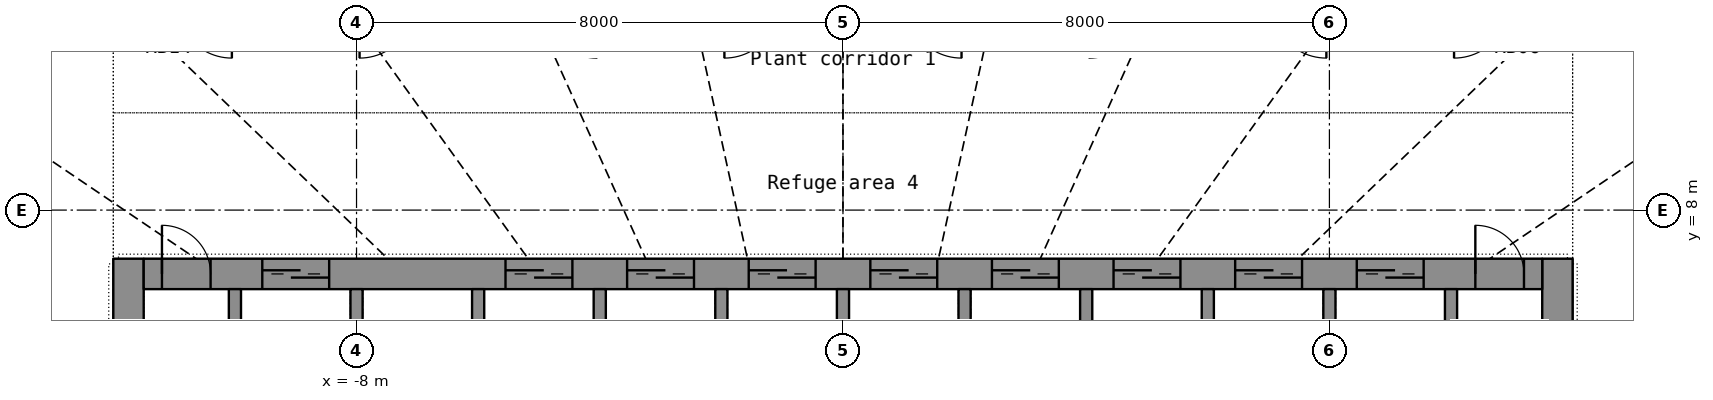
"""IFC4 building model, lengths in metres.
Left out: names, types, materials, properties, quantities, classifications, styles, units other than length and angle.
Written with IfcOpenShell. Run it as: python <this file> out.ifc"""

import sys

from ifc_helpers import new_model, si_unit, direction, frame, frame_2d, origin, place, context, subcontext, project, spatial, rectangle, extrude, element, fill, save


model = new_model("IFC4")
c1 = context("Model", 3, precision=1e-05, world=origin(), true_north=direction((0.0, 1.0)))
c2 = subcontext(c1, "Body", "Model", "MODEL_VIEW")
j1 = project(units=[si_unit("LENGTHUNIT", "METRE"), si_unit("PLANEANGLEUNIT", "RADIAN")], contexts=[c1])
p1 = place(None, origin())
s1 = spatial("IfcSite", under=j1, at=p1, CompositionType="ELEMENT")
p2 = place(p1, origin())
s2 = spatial("IfcBuilding", under=s1, at=p2, CompositionType="ELEMENT")
p3 = place(p2, frame((0.0, 0.0, 152.6)))
s3 = spatial("IfcBuildingStorey", under=s2, at=p3, CompositionType="ELEMENT", Elevation=152.6)
p4 = place(p3, frame((-11.75, -7.2, 0.0), z_axis=(0.0, 0.0, 1.0), x_axis=(0.0, 1.0, 0.0)))
e1 = element("IfcWall", 1, at=p4, inside=s3, PredefinedType="SHEAR", context=c2, shape_type="SweptSolid", body=[
    extrude(rectangle(XDim=14.4, YDim=0.5, at=frame_2d((7.2, 0.0))), origin(), (0.0, 0.0, 1.0), 4.1),
])
p5 = place(p4, frame((6.5, 0.0, 0.0)))
e2 = element("IfcOpeningElement", 2, at=p5, cuts=e1, PredefinedType="OPENING", context=c2, shape_type="SweptSolid", body=[
    extrude(rectangle(XDim=1.4, YDim=2.2, at=frame_2d((0.7, 1.1))), frame((0.0, 0.26, 0.0), z_axis=(0.0, -1.0, 0.0), x_axis=(1.0, 0.0, 0.0)), (0.0, 0.0, 1.0), 0.52),
])
p6 = place(p3, frame((11.75, -7.2, 0.0), z_axis=(0.0, 0.0, 1.0), x_axis=(0.0, 1.0, 0.0)))
e3 = element("IfcWall", 3, at=p6, inside=s3, PredefinedType="SHEAR", context=c2, shape_type="SweptSolid", body=[
    extrude(rectangle(XDim=14.4, YDim=0.5, at=frame_2d((7.2, 0.0))), origin(), (0.0, 0.0, 1.0), 4.1),
])
p7 = place(p6, frame((6.5, 0.0, 0.0)))
e4 = element("IfcOpeningElement", 4, at=p7, cuts=e3, PredefinedType="OPENING", context=c2, shape_type="SweptSolid", body=[
    extrude(rectangle(XDim=1.4, YDim=2.2, at=frame_2d((0.7, 1.1))), frame((0.0, 0.26, 0.0), z_axis=(0.0, -1.0, 0.0), x_axis=(1.0, 0.0, 0.0)), (0.0, 0.0, 1.0), 0.52),
])
p8 = place(p3, frame((-11.5, 6.95, 0.0), z_axis=(0.0, 0.0, 1.0), x_axis=(1.0, 0.0, 0.0)))
e5 = element("IfcWall", 5, at=p8, inside=s3, PredefinedType="SHEAR", context=c2, shape_type="SweptSolid", body=[
    extrude(rectangle(XDim=23.0, YDim=0.5, at=frame_2d((11.5, 0.0))), origin(), (0.0, 0.0, 1.0), 4.1),
])
p9 = place(p8, frame((1.95, 0.0, 0.0)))
e6 = element("IfcOpeningElement", 6, at=p9, cuts=e5, PredefinedType="OPENING", context=c2, shape_type="SweptSolid", body=[
    extrude(rectangle(XDim=1.1, YDim=2.2, at=frame_2d((0.55, 1.1))), frame((0.0, 0.26, 0.0), z_axis=(0.0, -1.0, 0.0), x_axis=(1.0, 0.0, 0.0)), (0.0, 0.0, 1.0), 0.52),
])
p10 = place(p8, frame((5.95, 0.0, 0.0)))
e7 = element("IfcOpeningElement", 7, at=p10, cuts=e5, PredefinedType="OPENING", context=c2, shape_type="SweptSolid", body=[
    extrude(rectangle(XDim=1.1, YDim=2.2, at=frame_2d((0.55, 1.1))), frame((0.0, 0.26, 0.0), z_axis=(0.0, -1.0, 0.0), x_axis=(1.0, 0.0, 0.0)), (0.0, 0.0, 1.0), 0.52),
])
p11 = place(p8, frame((7.95, 0.0, 0.0)))
e8 = element("IfcOpeningElement", 8, at=p11, cuts=e5, PredefinedType="OPENING", context=c2, shape_type="SweptSolid", body=[
    extrude(rectangle(XDim=1.1, YDim=2.2, at=frame_2d((0.55, 1.1))), frame((0.0, 0.26, 0.0), z_axis=(0.0, -1.0, 0.0), x_axis=(1.0, 0.0, 0.0)), (0.0, 0.0, 1.0), 0.52),
])
p12 = place(p8, frame((9.95, 0.0, 0.0)))
e9 = element("IfcOpeningElement", 9, at=p12, cuts=e5, PredefinedType="OPENING", context=c2, shape_type="SweptSolid", body=[
    extrude(rectangle(XDim=1.1, YDim=2.2, at=frame_2d((0.55, 1.1))), frame((0.0, 0.26, 0.0), z_axis=(0.0, -1.0, 0.0), x_axis=(1.0, 0.0, 0.0)), (0.0, 0.0, 1.0), 0.52),
])
p13 = place(p8, frame((11.95, 0.0, 0.0)))
e10 = element("IfcOpeningElement", 10, at=p13, cuts=e5, PredefinedType="OPENING", context=c2, shape_type="SweptSolid", body=[
    extrude(rectangle(XDim=1.1, YDim=2.2, at=frame_2d((0.55, 1.1))), frame((0.0, 0.26, 0.0), z_axis=(0.0, -1.0, 0.0), x_axis=(1.0, 0.0, 0.0)), (0.0, 0.0, 1.0), 0.52),
])
p14 = place(p8, frame((13.95, 0.0, 0.0)))
e11 = element("IfcOpeningElement", 11, at=p14, cuts=e5, PredefinedType="OPENING", context=c2, shape_type="SweptSolid", body=[
    extrude(rectangle(XDim=1.1, YDim=2.2, at=frame_2d((0.55, 1.1))), frame((0.0, 0.26, 0.0), z_axis=(0.0, -1.0, 0.0), x_axis=(1.0, 0.0, 0.0)), (0.0, 0.0, 1.0), 0.52),
])
p15 = place(p8, frame((15.95, 0.0, 0.0)))
e12 = element("IfcOpeningElement", 12, at=p15, cuts=e5, PredefinedType="OPENING", context=c2, shape_type="SweptSolid", body=[
    extrude(rectangle(XDim=1.1, YDim=2.2, at=frame_2d((0.55, 1.1))), frame((0.0, 0.26, 0.0), z_axis=(0.0, -1.0, 0.0), x_axis=(1.0, 0.0, 0.0)), (0.0, 0.0, 1.0), 0.52),
])
p16 = place(p8, frame((17.95, 0.0, 0.0)))
e13 = element("IfcOpeningElement", 13, at=p16, cuts=e5, PredefinedType="OPENING", context=c2, shape_type="SweptSolid", body=[
    extrude(rectangle(XDim=1.1, YDim=2.2, at=frame_2d((0.55, 1.1))), frame((0.0, 0.26, 0.0), z_axis=(0.0, -1.0, 0.0), x_axis=(1.0, 0.0, 0.0)), (0.0, 0.0, 1.0), 0.52),
])
p17 = place(p8, frame((19.95, 0.0, 0.0)))
e14 = element("IfcOpeningElement", 14, at=p17, cuts=e5, PredefinedType="OPENING", context=c2, shape_type="SweptSolid", body=[
    extrude(rectangle(XDim=1.1, YDim=2.2, at=frame_2d((0.55, 1.1))), frame((0.0, 0.26, 0.0), z_axis=(0.0, -1.0, 0.0), x_axis=(1.0, 0.0, 0.0)), (0.0, 0.0, 1.0), 0.52),
])
p18 = place(p8, frame((0.3, 0.0, 0.0)))
e15 = element("IfcOpeningElement", 15, at=p18, cuts=e5, PredefinedType="OPENING", context=c2, shape_type="SweptSolid", body=[
    extrude(rectangle(XDim=0.8, YDim=2.05, at=frame_2d((0.4, 1.025))), frame((0.0, 0.26, 0.0), z_axis=(0.0, -1.0, 0.0), x_axis=(1.0, 0.0, 0.0)), (0.0, 0.0, 1.0), 0.52),
])
p19 = place(p8, frame((21.9, 0.0, 0.0)))
e16 = element("IfcOpeningElement", 16, at=p19, cuts=e5, PredefinedType="OPENING", context=c2, shape_type="SweptSolid", body=[
    extrude(rectangle(XDim=0.8, YDim=2.05, at=frame_2d((0.4, 1.025))), frame((0.0, 0.26, 0.0), z_axis=(0.0, -1.0, 0.0), x_axis=(1.0, 0.0, 0.0)), (0.0, 0.0, 1.0), 0.52),
])
for number, where, z_axis, x_axis in (
    (17, (-10.0, 3.9, 0.0), (0.0, 0.0, 1.0), (0.0, 1.0, 0.0)),
    (18, (-8.0, 3.9, 0.0), (0.0, 0.0, 1.0), (0.0, 1.0, 0.0)),
    (19, (-6.0, 3.9, 0.0), (0.0, 0.0, 1.0), (0.0, 1.0, 0.0)),
    (20, (-4.0, 3.9, 0.0), (0.0, 0.0, 1.0), (0.0, 1.0, 0.0)),
    (21, (-2.0, 3.9, 0.0), (0.0, 0.0, 1.0), (0.0, 1.0, 0.0)),
    (22, (0.0, 3.9, 0.0), (0.0, 0.0, 1.0), (0.0, 1.0, 0.0)),
    (23, (2.0, 3.9, 0.0), (0.0, 0.0, 1.0), (0.0, 1.0, 0.0)),
    (24, (4.0, 3.9, 0.0), (0.0, 0.0, 1.0), (0.0, 1.0, 0.0)),
    (25, (6.0, 3.9, 0.0), (0.0, 0.0, 1.0), (0.0, 1.0, 0.0)),
    (26, (8.0, 3.9, 0.0), (0.0, 0.0, 1.0), (0.0, 1.0, 0.0)),
    (27, (10.0, 3.9, 0.0), (0.0, 0.0, 1.0), (0.0, 1.0, 0.0)),
):
    element("IfcWall", number, at=place(p3, frame(where, z_axis=z_axis, x_axis=x_axis)), inside=s3, PredefinedType="SHEAR", context=c2, shape_type="SweptSolid", body=[
        extrude(rectangle(XDim=2.8, YDim=0.2, at=frame_2d((1.4, 0.0))), origin(), (0.0, 0.0, 1.0), 4.1),
    ])
p20 = place(p9, origin())
e28 = element("IfcDoor", 28, at=p20, inside=s3, OperationType="DOUBLE_DOOR_SLIDING", PredefinedType="DOOR", context=c2, shape_type="SweptSolid", body=[
    extrude(rectangle(XDim=1.1, YDim=2.2, at=frame_2d((0.55, 1.1))), frame((0.0, 0.025, 0.0), z_axis=(0.0, -1.0, 0.0), x_axis=(1.0, 0.0, 0.0)), (0.0, 0.0, 1.0), 0.05),
])
fill(e6, e28)
p21 = place(p10, origin())
e29 = element("IfcDoor", 29, at=p21, inside=s3, OperationType="DOUBLE_DOOR_SLIDING", PredefinedType="DOOR", context=c2, shape_type="SweptSolid", body=[
    extrude(rectangle(XDim=1.1, YDim=2.2, at=frame_2d((0.55, 1.1))), frame((0.0, 0.025, 0.0), z_axis=(0.0, -1.0, 0.0), x_axis=(1.0, 0.0, 0.0)), (0.0, 0.0, 1.0), 0.05),
])
fill(e7, e29)
p22 = place(p11, origin())
e30 = element("IfcDoor", 30, at=p22, inside=s3, OperationType="DOUBLE_DOOR_SLIDING", PredefinedType="DOOR", context=c2, shape_type="SweptSolid", body=[
    extrude(rectangle(XDim=1.1, YDim=2.2, at=frame_2d((0.55, 1.1))), frame((0.0, 0.025, 0.0), z_axis=(0.0, -1.0, 0.0), x_axis=(1.0, 0.0, 0.0)), (0.0, 0.0, 1.0), 0.05),
])
fill(e8, e30)
p23 = place(p12, origin())
e31 = element("IfcDoor", 31, at=p23, inside=s3, OperationType="DOUBLE_DOOR_SLIDING", PredefinedType="DOOR", context=c2, shape_type="SweptSolid", body=[
    extrude(rectangle(XDim=1.1, YDim=2.2, at=frame_2d((0.55, 1.1))), frame((0.0, 0.025, 0.0), z_axis=(0.0, -1.0, 0.0), x_axis=(1.0, 0.0, 0.0)), (0.0, 0.0, 1.0), 0.05),
])
fill(e9, e31)
p24 = place(p13, origin())
e32 = element("IfcDoor", 32, at=p24, inside=s3, OperationType="DOUBLE_DOOR_SLIDING", PredefinedType="DOOR", context=c2, shape_type="SweptSolid", body=[
    extrude(rectangle(XDim=1.1, YDim=2.2, at=frame_2d((0.55, 1.1))), frame((0.0, 0.025, 0.0), z_axis=(0.0, -1.0, 0.0), x_axis=(1.0, 0.0, 0.0)), (0.0, 0.0, 1.0), 0.05),
])
fill(e10, e32)
p25 = place(p14, origin())
e33 = element("IfcDoor", 33, at=p25, inside=s3, OperationType="DOUBLE_DOOR_SLIDING", PredefinedType="DOOR", context=c2, shape_type="SweptSolid", body=[
    extrude(rectangle(XDim=1.1, YDim=2.2, at=frame_2d((0.55, 1.1))), frame((0.0, 0.025, 0.0), z_axis=(0.0, -1.0, 0.0), x_axis=(1.0, 0.0, 0.0)), (0.0, 0.0, 1.0), 0.05),
])
fill(e11, e33)
p26 = place(p15, origin())
e34 = element("IfcDoor", 34, at=p26, inside=s3, OperationType="DOUBLE_DOOR_SLIDING", PredefinedType="DOOR", context=c2, shape_type="SweptSolid", body=[
    extrude(rectangle(XDim=1.1, YDim=2.2, at=frame_2d((0.55, 1.1))), frame((0.0, 0.025, 0.0), z_axis=(0.0, -1.0, 0.0), x_axis=(1.0, 0.0, 0.0)), (0.0, 0.0, 1.0), 0.05),
])
fill(e12, e34)
p27 = place(p16, origin())
e35 = element("IfcDoor", 35, at=p27, inside=s3, OperationType="DOUBLE_DOOR_SLIDING", PredefinedType="DOOR", context=c2, shape_type="SweptSolid", body=[
    extrude(rectangle(XDim=1.1, YDim=2.2, at=frame_2d((0.55, 1.1))), frame((0.0, 0.025, 0.0), z_axis=(0.0, -1.0, 0.0), x_axis=(1.0, 0.0, 0.0)), (0.0, 0.0, 1.0), 0.05),
])
fill(e13, e35)
p28 = place(p17, origin())
e36 = element("IfcDoor", 36, at=p28, inside=s3, OperationType="DOUBLE_DOOR_SLIDING", PredefinedType="DOOR", context=c2, shape_type="SweptSolid", body=[
    extrude(rectangle(XDim=1.1, YDim=2.2, at=frame_2d((0.55, 1.1))), frame((0.0, 0.025, 0.0), z_axis=(0.0, -1.0, 0.0), x_axis=(1.0, 0.0, 0.0)), (0.0, 0.0, 1.0), 0.05),
])
fill(e14, e36)
p29 = place(p18, origin())
e37 = element("IfcDoor", 37, at=p29, inside=s3, OperationType="SINGLE_SWING_LEFT", PredefinedType="DOOR", context=c2, shape_type="SweptSolid", body=[
    extrude(rectangle(XDim=0.8, YDim=2.05, at=frame_2d((0.4, 1.025))), frame((0.0, 0.025, 0.0), z_axis=(0.0, -1.0, 0.0), x_axis=(1.0, 0.0, 0.0)), (0.0, 0.0, 1.0), 0.05),
])
fill(e15, e37)
p30 = place(p19, origin())
e38 = element("IfcDoor", 38, at=p30, inside=s3, OperationType="SINGLE_SWING_LEFT", PredefinedType="DOOR", context=c2, shape_type="SweptSolid", body=[
    extrude(rectangle(XDim=0.8, YDim=2.05, at=frame_2d((0.4, 1.025))), frame((0.0, 0.025, 0.0), z_axis=(0.0, -1.0, 0.0), x_axis=(1.0, 0.0, 0.0)), (0.0, 0.0, 1.0), 0.05),
])
fill(e16, e38)
save(model, sys.argv[1])
